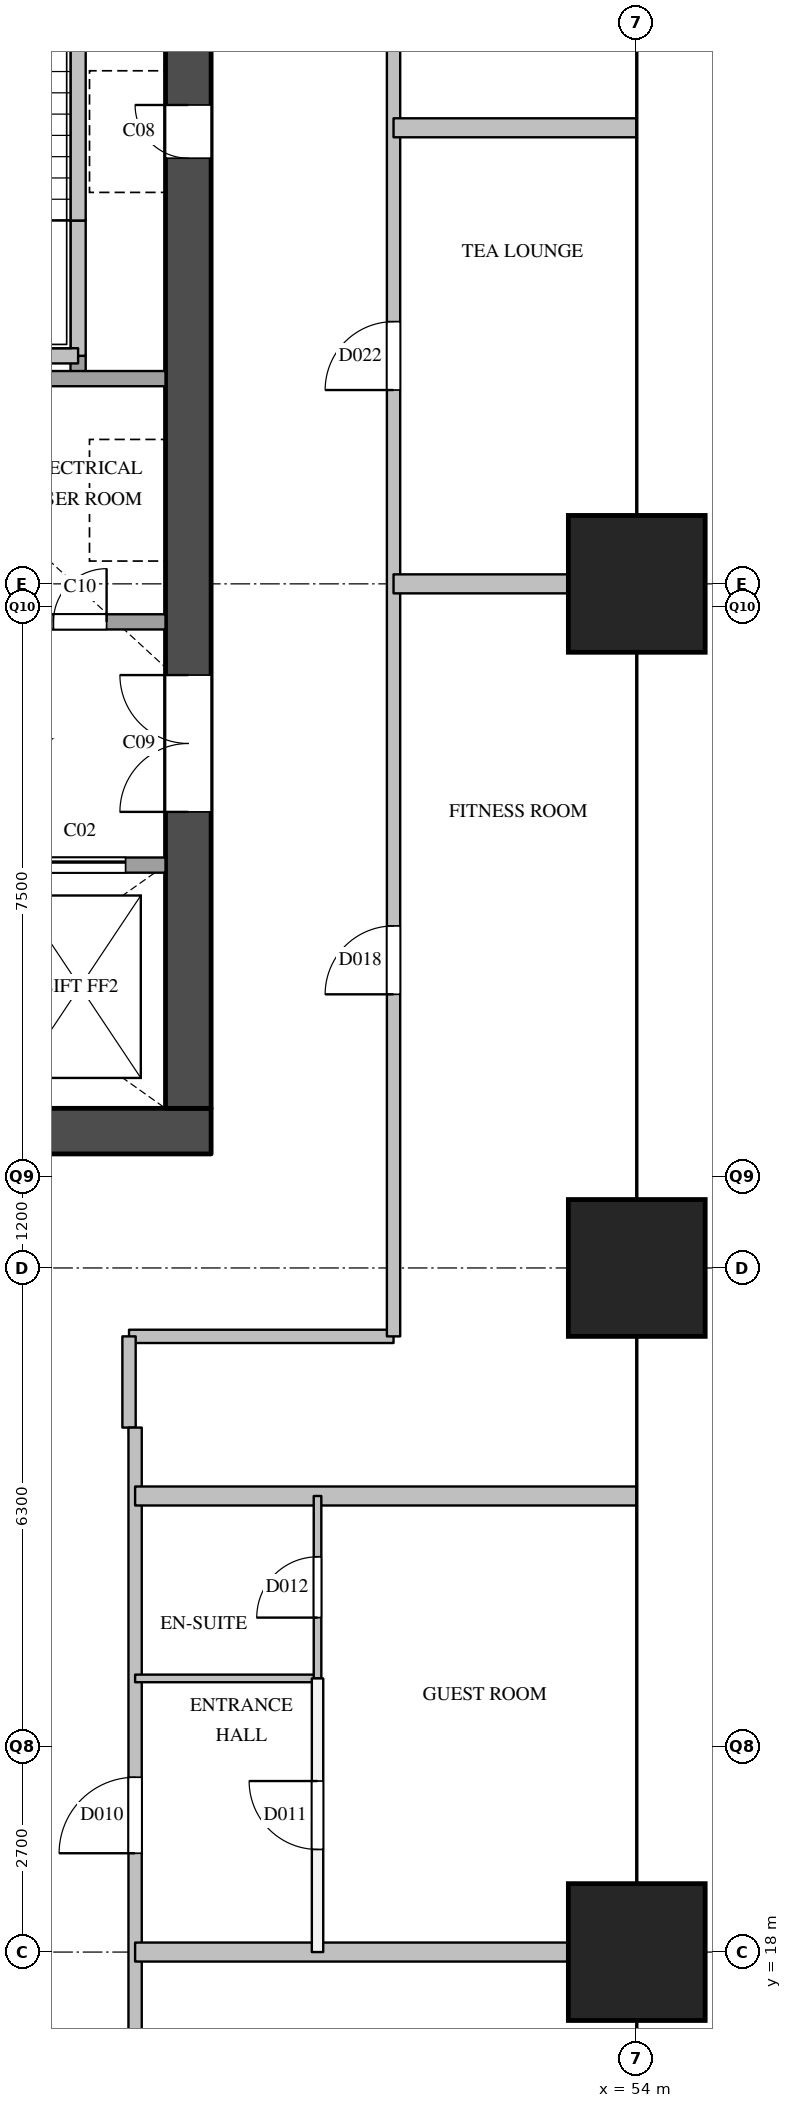
"""IFC4 building model, lengths in metres.
Left out: names, types, materials, properties, quantities, classifications, styles, units other than length and angle.
Written with IfcOpenShell. Run it as: python <this file> out.ifc"""

import sys

from ifc_helpers import new_model, si_unit, direction, frame, frame_2d, origin, origin_2d, place, context, subcontext, project, spatial, rectangle, extrude, element, fill, save


model = new_model("IFC4")
c1 = context("Model", 3, precision=1e-05, world=origin(), true_north=direction((0.0, 1.0)))
c2 = subcontext(c1, "Body", "Model", "MODEL_VIEW")
j1 = project(units=[si_unit("LENGTHUNIT", "METRE"), si_unit("PLANEANGLEUNIT", "RADIAN")], contexts=[c1])
p1 = place(None, origin())
s1 = spatial("IfcSite", under=j1, at=p1, CompositionType="ELEMENT")
p2 = place(p1, origin())
s2 = spatial("IfcBuilding", under=s1, at=p2, CompositionType="ELEMENT")
p3 = place(p2, frame((0.0, 0.0, 65.2)))
s3 = spatial("IfcBuildingStorey", under=s2, at=p3, CompositionType="ELEMENT", Elevation=65.2)
for number, where, z_axis, x_axis in (
    (1, (54.0, 18.0, 0.0), (0.0, 0.0, 1.0), (1.0, 0.0, 0.0)),
    (2, (54.0, 27.0, 0.0), (0.0, 0.0, 1.0), (1.0, 0.0, 0.0)),
    (3, (54.0, 36.0, 0.0), (0.0, 0.0, 1.0), (1.0, 0.0, 0.0)),
):
    element("IfcColumn", number, at=place(p3, frame(where, z_axis=z_axis, x_axis=x_axis)), inside=s3, PredefinedType="COLUMN", context=c2, shape_type="SweptSolid", body=[
        extrude(rectangle(XDim=1.8, YDim=1.8, at=origin_2d()), origin(), (0.0, 0.0, 1.0), 3.8),
    ])
p4 = place(p3, frame((36.0, 28.8, 0.0), z_axis=(0.0, 0.0, 1.0), x_axis=(1.0, 0.0, 0.0)))
e4 = element("IfcWall", 4, at=p4, inside=s3, PredefinedType="SHEAR", context=c2, shape_type="SweptSolid", body=[
    extrude(rectangle(XDim=12.4, YDim=0.6, at=frame_2d((6.2, 0.0))), origin(), (0.0, 0.0, 1.0), 3.5),
])
p5 = place(p3, frame((48.1, 29.1, 0.0), z_axis=(0.0, 0.0, 1.0), x_axis=(0.0, 1.0, 0.0)))
e5 = element("IfcWall", 5, at=p5, inside=s3, PredefinedType="SHEAR", context=c2, shape_type="SweptSolid", body=[
    extrude(rectangle(XDim=20.3, YDim=0.6, at=frame_2d((10.15, 0.0))), origin(), (0.0, 0.0, 1.0), 3.5),
])
p6 = place(p5, frame((12.5, 0.0, 0.0)))
e6 = element("IfcOpeningElement", 6, at=p6, cuts=e5, PredefinedType="OPENING", context=c2, shape_type="SweptSolid", body=[
    extrude(rectangle(XDim=0.7, YDim=2.1, at=frame_2d((0.35, 1.05))), frame((0.0, 0.31, 0.0), z_axis=(0.0, -1.0, 0.0), x_axis=(1.0, 0.0, 0.0)), (0.0, 0.0, 1.0), 0.62),
])
p7 = place(p5, frame((3.9, 0.0, 0.0)))
e7 = element("IfcOpeningElement", 7, at=p7, cuts=e5, PredefinedType="OPENING", context=c2, shape_type="SweptSolid", body=[
    extrude(rectangle(XDim=1.8, YDim=2.1, at=frame_2d((0.9, 1.05))), frame((0.0, 0.31, 0.0), z_axis=(0.0, -1.0, 0.0), x_axis=(1.0, 0.0, 0.0)), (0.0, 0.0, 1.0), 0.62),
])
p8 = place(p3, frame((46.65, 38.7, 0.0), z_axis=(0.0, 0.0, 1.0), x_axis=(0.0, 1.0, 0.0)))
e8 = element("IfcWall", 8, at=p8, inside=s3, PredefinedType="SOLIDWALL", context=c2, shape_type="SweptSolid", body=[
    extrude(rectangle(XDim=0.3, YDim=0.2, at=frame_2d((0.15, 0.0))), origin(), (0.0, 0.0, 1.0), 3.5),
])
p9 = place(p3, frame((46.65, 39.0, 0.0), z_axis=(0.0, 0.0, 1.0), x_axis=(0.0, 1.0, 0.0)))
e9 = element("IfcWall", 9, at=p9, inside=s3, PredefinedType="SOLIDWALL", context=c2, shape_type="SweptSolid", body=[
    extrude(rectangle(XDim=1.78, YDim=0.2, at=frame_2d((0.89, 0.0))), origin(), (0.0, 0.0, 1.0), 3.5),
])
p10 = place(p3, frame((46.65, 40.78, 0.0), z_axis=(0.0, 0.0, 1.0), x_axis=(0.0, 1.0, 0.0)))
e10 = element("IfcWall", 10, at=p10, inside=s3, PredefinedType="SOLIDWALL", context=c2, shape_type="SweptSolid", body=[
    extrude(rectangle(XDim=4.42, YDim=0.2, at=frame_2d((2.21, 0.0))), origin(), (0.0, 0.0, 1.0), 3.5),
])
p11 = place(p3, frame((36.6, 32.3, 0.0), z_axis=(0.0, 0.0, 1.0), x_axis=(1.0, 0.0, 0.0)))
e11 = element("IfcWall", 11, at=p11, inside=s3, PredefinedType="SOLIDWALL", context=c2, shape_type="SweptSolid", body=[
    extrude(rectangle(XDim=11.2, YDim=0.2, at=frame_2d((5.6, 0.0))), origin(), (0.0, 0.0, 1.0), 3.5),
])
p12 = place(p11, frame((7.225, 0.0, 0.0)))
e12 = element("IfcOpeningElement", 12, at=p12, cuts=e11, PredefinedType="OPENING", context=c2, shape_type="SweptSolid", body=[
    extrude(rectangle(XDim=1.2, YDim=2.1, at=frame_2d((0.6, 1.05))), frame((0.0, 0.11, 0.0), z_axis=(0.0, -1.0, 0.0), x_axis=(1.0, 0.0, 0.0)), (0.0, 0.0, 1.0), 0.22),
])
p13 = place(p11, frame((9.475, 0.0, 0.0)))
e13 = element("IfcOpeningElement", 13, at=p13, cuts=e11, PredefinedType="OPENING", context=c2, shape_type="SweptSolid", body=[
    extrude(rectangle(XDim=1.2, YDim=2.1, at=frame_2d((0.6, 1.05))), frame((0.0, 0.11, 0.0), z_axis=(0.0, -1.0, 0.0), x_axis=(1.0, 0.0, 0.0)), (0.0, 0.0, 1.0), 0.22),
])
p14 = place(p3, frame((43.3, 35.5, 0.0), z_axis=(0.0, 0.0, 1.0), x_axis=(1.0, 0.0, 0.0)))
e14 = element("IfcWall", 14, at=p14, inside=s3, PredefinedType="SOLIDWALL", context=c2, shape_type="SweptSolid", body=[
    extrude(rectangle(XDim=4.5, YDim=0.2, at=frame_2d((2.25, 0.0))), origin(), (0.0, 0.0, 1.0), 3.5),
])
p15 = place(p14, frame((0.525, 0.0, 0.0)))
e15 = element("IfcOpeningElement", 15, at=p15, cuts=e14, PredefinedType="OPENING", context=c2, shape_type="SweptSolid", body=[
    extrude(rectangle(XDim=1.2, YDim=2.1, at=frame_2d((0.6, 1.05))), frame((0.0, 0.11, 0.0), z_axis=(0.0, -1.0, 0.0), x_axis=(1.0, 0.0, 0.0)), (0.0, 0.0, 1.0), 0.22),
])
p16 = place(p14, frame((3.025, 0.0, 0.0)))
e16 = element("IfcOpeningElement", 16, at=p16, cuts=e14, PredefinedType="OPENING", context=c2, shape_type="SweptSolid", body=[
    extrude(rectangle(XDim=0.7, YDim=2.1, at=frame_2d((0.35, 1.05))), frame((0.0, 0.11, 0.0), z_axis=(0.0, -1.0, 0.0), x_axis=(1.0, 0.0, 0.0)), (0.0, 0.0, 1.0), 0.22),
])
p17 = place(p3, frame((43.3, 38.7, 0.0), z_axis=(0.0, 0.0, 1.0), x_axis=(1.0, 0.0, 0.0)))
e17 = element("IfcWall", 17, at=p17, inside=s3, PredefinedType="SOLIDWALL", context=c2, shape_type="SweptSolid", body=[
    extrude(rectangle(XDim=4.5, YDim=0.2, at=frame_2d((2.25, 0.0))), origin(), (0.0, 0.0, 1.0), 3.5),
])
p18 = place(p3, frame((43.4, 39.0, 0.0), z_axis=(0.0, 0.0, 1.0), x_axis=(1.0, 0.0, 0.0)))
e18 = element("IfcWall", 18, at=p18, inside=s3, PredefinedType="SOLIDWALL", context=c2, shape_type="SweptSolid", body=[
    extrude(rectangle(XDim=3.25, YDim=0.2, at=frame_2d((1.625, 0.0))), origin(), (0.0, 0.0, 1.0), 3.5),
])
p19 = place(p3, frame((47.32, 24.9, 0.0), z_axis=(0.0, 0.0, 1.0), x_axis=(1.0, 0.0, 0.0)))
e19 = element("IfcWall", 19, at=p19, inside=s3, PredefinedType="PARTITIONING", context=c2, shape_type="SweptSolid", body=[
    extrude(rectangle(XDim=0.08, YDim=0.175, at=frame_2d((0.04, 0.0))), origin(), (0.0, 0.0, 1.0), 3.5),
])
p20 = place(p3, frame((47.32, 26.1, 0.0), z_axis=(0.0, 0.0, 1.0), x_axis=(1.0, 0.0, 0.0)))
e20 = element("IfcWall", 20, at=p20, inside=s3, PredefinedType="PARTITIONING", context=c2, shape_type="SweptSolid", body=[
    extrude(rectangle(XDim=3.48, YDim=0.175, at=frame_2d((1.74, 0.0))), origin(), (0.0, 0.0, 1.0), 3.5),
])
p21 = place(p3, frame((47.32, 24.9, 0.0), z_axis=(0.0, 0.0, 1.0), x_axis=(0.0, 1.0, 0.0)))
e21 = element("IfcWall", 21, at=p21, inside=s3, PredefinedType="PARTITIONING", context=c2, shape_type="SweptSolid", body=[
    extrude(rectangle(XDim=1.2, YDim=0.175, at=frame_2d((0.6, 0.0))), origin(), (0.0, 0.0, 1.0), 3.5),
])
p22 = place(p3, frame((47.4, 6.6, 0.0), z_axis=(0.0, 0.0, 1.0), x_axis=(0.0, 1.0, 0.0)))
e22 = element("IfcWall", 22, at=p22, inside=s3, PredefinedType="PARTITIONING", context=c2, shape_type="SweptSolid", body=[
    extrude(rectangle(XDim=18.3, YDim=0.175, at=frame_2d((9.15, 0.0))), origin(), (0.0, 0.0, 1.0), 3.5),
])
p23 = place(p22, frame((5.25, 0.0, 0.0)))
e23 = element("IfcOpeningElement", 23, at=p23, cuts=e22, PredefinedType="OPENING", context=c2, shape_type="SweptSolid", body=[
    extrude(rectangle(XDim=0.9, YDim=2.1, at=frame_2d((0.45, 1.05))), frame((0.0, 0.097, 0.0), z_axis=(0.0, -1.0, 0.0), x_axis=(1.0, 0.0, 0.0)), (0.0, 0.0, 1.0), 0.195),
])
p24 = place(p22, frame((12.7, 0.0, 0.0)))
e24 = element("IfcOpeningElement", 24, at=p24, cuts=e22, PredefinedType="OPENING", context=c2, shape_type="SweptSolid", body=[
    extrude(rectangle(XDim=1.0, YDim=2.1, at=frame_2d((0.5, 1.05))), frame((0.0, 0.097, 0.0), z_axis=(0.0, -1.0, 0.0), x_axis=(1.0, 0.0, 0.0)), (0.0, 0.0, 1.0), 0.195),
])
p25 = place(p3, frame((50.8, 26.1, 0.0), z_axis=(0.0, 0.0, 1.0), x_axis=(0.0, 1.0, 0.0)))
e25 = element("IfcWall", 25, at=p25, inside=s3, PredefinedType="PARTITIONING", context=c2, shape_type="SweptSolid", body=[
    extrude(rectangle(XDim=26.3, YDim=0.175, at=frame_2d((13.15, 0.0))), origin(), (0.0, 0.0, 1.0), 2.5),
])
p26 = place(p25, frame((4.5, 0.0, 0.0)))
e26 = element("IfcOpeningElement", 26, at=p26, cuts=e25, PredefinedType="OPENING", context=c2, shape_type="SweptSolid", body=[
    extrude(rectangle(XDim=0.9, YDim=2.1, at=frame_2d((0.45, 1.05))), frame((0.0, 0.097, 0.0), z_axis=(0.0, -1.0, 0.0), x_axis=(1.0, 0.0, 0.0)), (0.0, 0.0, 1.0), 0.195),
])
p27 = place(p25, frame((12.45, 0.0, 0.0)))
e27 = element("IfcOpeningElement", 27, at=p27, cuts=e25, PredefinedType="OPENING", context=c2, shape_type="SweptSolid", body=[
    extrude(rectangle(XDim=0.9, YDim=2.1, at=frame_2d((0.45, 1.05))), frame((0.0, 0.097, 0.0), z_axis=(0.0, -1.0, 0.0), x_axis=(1.0, 0.0, 0.0)), (0.0, 0.0, 1.0), 0.195),
])
p28 = place(p25, frame((20.65, 0.0, 0.0)))
e28 = element("IfcOpeningElement", 28, at=p28, cuts=e25, PredefinedType="OPENING", context=c2, shape_type="SweptSolid", body=[
    extrude(rectangle(XDim=0.9, YDim=2.1, at=frame_2d((0.45, 1.05))), frame((0.0, 0.097, 0.0), z_axis=(0.0, -1.0, 0.0), x_axis=(1.0, 0.0, 0.0)), (0.0, 0.0, 1.0), 0.195),
])
p29 = place(p3, frame((49.8, 18.0, 0.0), z_axis=(0.0, 0.0, 1.0), x_axis=(0.0, 1.0, 0.0)))
e29 = element("IfcWall", 29, at=p29, inside=s3, PredefinedType="PARTITIONING", context=c2, shape_type="SweptSolid", body=[
    extrude(rectangle(XDim=3.6, YDim=0.15, at=frame_2d((1.8, 0.0))), origin(), (0.0, 0.0, 1.0), 3.5),
])
p30 = place(p29, frame((1.35, 0.0, 0.0)))
e30 = element("IfcOpeningElement", 30, at=p30, cuts=e29, PredefinedType="OPENING", context=c2, shape_type="SweptSolid", body=[
    extrude(rectangle(XDim=0.9, YDim=2.1, at=frame_2d((0.45, 1.05))), frame((0.0, 0.085, 0.0), z_axis=(0.0, -1.0, 0.0), x_axis=(1.0, 0.0, 0.0)), (0.0, 0.0, 1.0), 0.17),
])
p31 = place(p3, frame((47.4, 18.0, 0.0), z_axis=(0.0, 0.0, 1.0), x_axis=(1.0, 0.0, 0.0)))
e31 = element("IfcWall", 31, at=p31, inside=s3, PredefinedType="PARTITIONING", context=c2, shape_type="SweptSolid", body=[
    extrude(rectangle(XDim=6.6, YDim=0.25, at=frame_2d((3.3, 0.0))), origin(), (0.0, 0.0, 1.0), 3.5),
])
p32 = place(p3, frame((47.4, 24.0, 0.0), z_axis=(0.0, 0.0, 1.0), x_axis=(1.0, 0.0, 0.0)))
e32 = element("IfcWall", 32, at=p32, inside=s3, PredefinedType="PARTITIONING", context=c2, shape_type="SweptSolid", body=[
    extrude(rectangle(XDim=6.6, YDim=0.25, at=frame_2d((3.3, 0.0))), origin(), (0.0, 0.0, 1.0), 2.5),
])
p33 = place(p3, frame((50.8, 36.0, 0.0), z_axis=(0.0, 0.0, 1.0), x_axis=(1.0, 0.0, 0.0)))
e33 = element("IfcWall", 33, at=p33, inside=s3, PredefinedType="PARTITIONING", context=c2, shape_type="SweptSolid", body=[
    extrude(rectangle(XDim=3.2, YDim=0.25, at=frame_2d((1.6, 0.0))), origin(), (0.0, 0.0, 1.0), 3.5),
])
p34 = place(p3, frame((50.8, 42.0, 0.0), z_axis=(0.0, 0.0, 1.0), x_axis=(1.0, 0.0, 0.0)))
e34 = element("IfcWall", 34, at=p34, inside=s3, PredefinedType="PARTITIONING", context=c2, shape_type="SweptSolid", body=[
    extrude(rectangle(XDim=3.2, YDim=0.25, at=frame_2d((1.6, 0.0))), origin(), (0.0, 0.0, 1.0), 2.5),
])
p35 = place(p3, frame((47.4, 21.6, 0.0), z_axis=(0.0, 0.0, 1.0), x_axis=(1.0, 0.0, 0.0)))
e35 = element("IfcWall", 35, at=p35, inside=s3, PredefinedType="PARTITIONING", context=c2, shape_type="SweptSolid", body=[
    extrude(rectangle(XDim=2.4, YDim=0.1, at=frame_2d((1.2, 0.0))), origin(), (0.0, 0.0, 1.0), 3.5),
])
p36 = place(p3, frame((49.8, 21.6, 0.0), z_axis=(0.0, 0.0, 1.0), x_axis=(0.0, 1.0, 0.0)))
e36 = element("IfcWall", 36, at=p36, inside=s3, PredefinedType="PARTITIONING", context=c2, shape_type="SweptSolid", body=[
    extrude(rectangle(XDim=2.4, YDim=0.1, at=frame_2d((1.2, 0.0))), origin(), (0.0, 0.0, 1.0), 3.5),
])
p37 = place(p36, frame((0.8, 0.0, 0.0)))
e37 = element("IfcOpeningElement", 37, at=p37, cuts=e36, PredefinedType="OPENING", context=c2, shape_type="SweptSolid", body=[
    extrude(rectangle(XDim=0.8, YDim=2.1, at=frame_2d((0.4, 1.05))), frame((0.0, 0.06, 0.0), z_axis=(0.0, -1.0, 0.0), x_axis=(1.0, 0.0, 0.0)), (0.0, 0.0, 1.0), 0.12),
])
p38 = place(p13, origin())
e38 = element("IfcDoor", 38, at=p38, inside=s3, OperationType="SLIDING_TO_LEFT", PredefinedType="DOOR", context=c2, shape_type="SweptSolid", body=[
    extrude(rectangle(XDim=1.2, YDim=2.1, at=frame_2d((0.6, 1.05))), frame((0.0, 0.025, 0.0), z_axis=(0.0, -1.0, 0.0), x_axis=(1.0, 0.0, 0.0)), (0.0, 0.0, 1.0), 0.05),
])
fill(e13, e38)
p39 = place(p6, origin())
e39 = element("IfcDoor", 39, at=p39, inside=s3, OperationType="SINGLE_SWING_RIGHT", PredefinedType="DOOR", context=c2, shape_type="SweptSolid", body=[
    extrude(rectangle(XDim=0.7, YDim=2.1, at=frame_2d((0.35, 1.05))), frame((0.0, 0.025, 0.0), z_axis=(0.0, -1.0, 0.0), x_axis=(1.0, 0.0, 0.0)), (0.0, 0.0, 1.0), 0.05),
])
fill(e6, e39)
p40 = place(p7, origin())
e40 = element("IfcDoor", 40, at=p40, inside=s3, OperationType="DOUBLE_DOOR_SINGLE_SWING", PredefinedType="DOOR", context=c2, shape_type="SweptSolid", body=[
    extrude(rectangle(XDim=1.8, YDim=2.1, at=frame_2d((0.9, 1.05))), frame((0.0, 0.025, 0.0), z_axis=(0.0, -1.0, 0.0), x_axis=(1.0, 0.0, 0.0)), (0.0, 0.0, 1.0), 0.05),
])
fill(e7, e40)
p41 = place(p16, origin())
e41 = element("IfcDoor", 41, at=p41, inside=s3, OperationType="SINGLE_SWING_RIGHT", PredefinedType="DOOR", context=c2, shape_type="SweptSolid", body=[
    extrude(rectangle(XDim=0.7, YDim=2.1, at=frame_2d((0.35, 1.05))), frame((0.0, 0.025, 0.0), z_axis=(0.0, -1.0, 0.0), x_axis=(1.0, 0.0, 0.0)), (0.0, 0.0, 1.0), 0.05),
])
fill(e16, e41)
p42 = place(p24, origin())
e42 = element("IfcDoor", 42, at=p42, inside=s3, OperationType="SINGLE_SWING_LEFT", PredefinedType="DOOR", context=c2, shape_type="SweptSolid", body=[
    extrude(rectangle(XDim=1.0, YDim=2.1, at=frame_2d((0.5, 1.05))), frame((0.0, 0.025, 0.0), z_axis=(0.0, -1.0, 0.0), x_axis=(1.0, 0.0, 0.0)), (0.0, 0.0, 1.0), 0.05),
])
fill(e24, e42)
p43 = place(p30, origin())
e43 = element("IfcDoor", 43, at=p43, inside=s3, OperationType="SINGLE_SWING_RIGHT", PredefinedType="DOOR", context=c2, shape_type="SweptSolid", body=[
    extrude(rectangle(XDim=0.9, YDim=2.1, at=frame_2d((0.45, 1.05))), frame((0.0, 0.025, 0.0), z_axis=(0.0, -1.0, 0.0), x_axis=(1.0, 0.0, 0.0)), (0.0, 0.0, 1.0), 0.05),
])
fill(e30, e43)
p44 = place(p37, origin())
e44 = element("IfcDoor", 44, at=p44, inside=s3, OperationType="SINGLE_SWING_LEFT", PredefinedType="DOOR", context=c2, shape_type="SweptSolid", body=[
    extrude(rectangle(XDim=0.8, YDim=2.1, at=frame_2d((0.4, 1.05))), frame((0.0, 0.025, 0.0), z_axis=(0.0, -1.0, 0.0), x_axis=(1.0, 0.0, 0.0)), (0.0, 0.0, 1.0), 0.05),
])
fill(e37, e44)
p45 = place(p26, origin())
e45 = element("IfcDoor", 45, at=p45, inside=s3, OperationType="SINGLE_SWING_LEFT", PredefinedType="DOOR", context=c2, shape_type="SweptSolid", body=[
    extrude(rectangle(XDim=0.9, YDim=2.1, at=frame_2d((0.45, 1.05))), frame((0.0, 0.025, 0.0), z_axis=(0.0, -1.0, 0.0), x_axis=(1.0, 0.0, 0.0)), (0.0, 0.0, 1.0), 0.05),
])
fill(e26, e45)
p46 = place(p27, origin())
e46 = element("IfcDoor", 46, at=p46, inside=s3, OperationType="SINGLE_SWING_LEFT", PredefinedType="DOOR", context=c2, shape_type="SweptSolid", body=[
    extrude(rectangle(XDim=0.9, YDim=2.1, at=frame_2d((0.45, 1.05))), frame((0.0, 0.025, 0.0), z_axis=(0.0, -1.0, 0.0), x_axis=(1.0, 0.0, 0.0)), (0.0, 0.0, 1.0), 0.05),
])
fill(e27, e46)
save(model, sys.argv[1])
